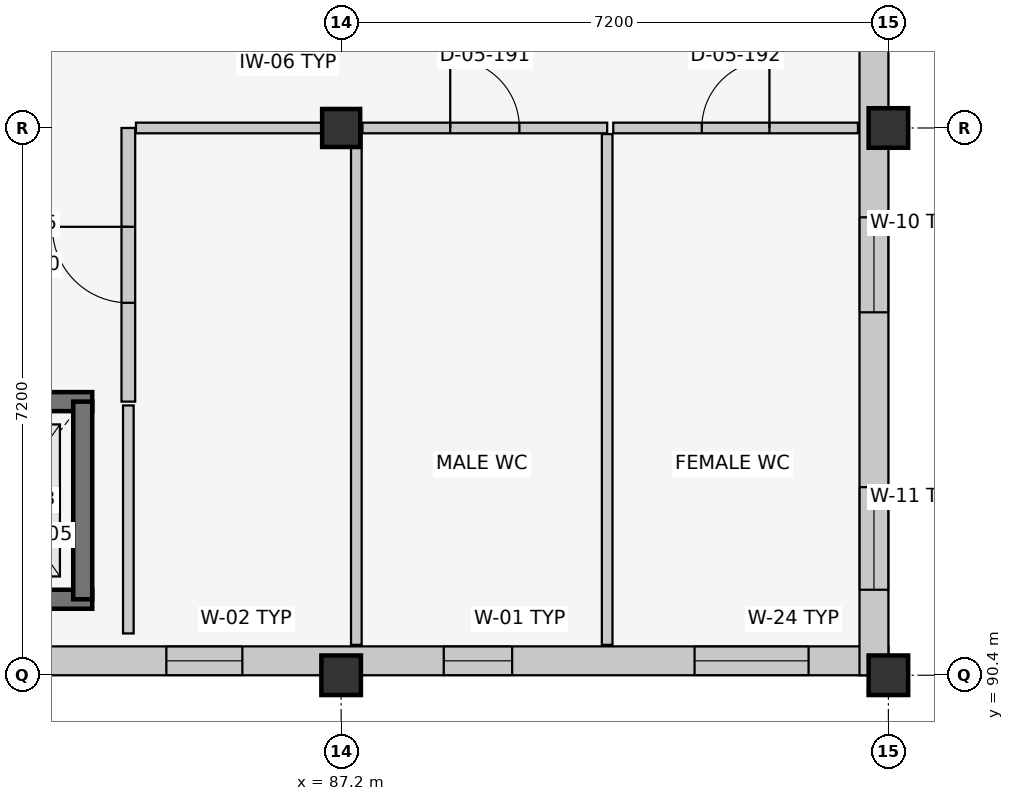
"""IFC4 building model, lengths in metres.
Left out: names, types, materials, properties, quantities, classifications, styles, units other than length and angle.
Written with IfcOpenShell. Run it as: python <this file> out.ifc"""

import sys

from ifc_helpers import new_model, si_unit, direction, frame, frame_2d, origin, origin_2d, place, context, subcontext, project, spatial, rectangle, extrude, element, fill, save


model = new_model("IFC4")
c1 = context("Model", 3, precision=1e-05, world=origin(), true_north=direction((0.0, 1.0)))
c2 = subcontext(c1, "Body", "Model", "MODEL_VIEW")
j1 = project(units=[si_unit("LENGTHUNIT", "METRE"), si_unit("PLANEANGLEUNIT", "RADIAN")], contexts=[c1])
p1 = place(None, origin())
s1 = spatial("IfcSite", under=j1, at=p1, CompositionType="ELEMENT")
p2 = place(p1, origin())
s2 = spatial("IfcBuilding", under=s1, at=p2, CompositionType="ELEMENT")
p3 = place(p2, frame((0.0, 0.0, 21.9)))
s3 = spatial("IfcBuildingStorey", under=s2, at=p3, CompositionType="ELEMENT", Elevation=21.9)
p4 = place(p3, frame((87.2, 90.4, 0.0), z_axis=(0.0, 0.0, 1.0), x_axis=(1.0, 0.0, 0.0)))
e1 = element("IfcColumn", 1, at=p4, inside=s3, PredefinedType="COLUMN", context=c2, shape_type="SweptSolid", body=[
    extrude(rectangle(XDim=0.52, YDim=0.52, at=origin_2d()), origin(), (0.0, 0.0, 1.0), 3.9),
])
p5 = place(p3, frame((87.2, 97.6, 0.0), z_axis=(0.0, 0.0, 1.0), x_axis=(1.0, 0.0, 0.0)))
e2 = element("IfcColumn", 2, at=p5, inside=s3, PredefinedType="COLUMN", context=c2, shape_type="SweptSolid", body=[
    extrude(rectangle(XDim=0.5, YDim=0.5, at=origin_2d()), origin(), (0.0, 0.0, 1.0), 3.9),
])
for number, where, z_axis, x_axis in (
    (3, (94.4, 90.4, 0.0), (0.0, 0.0, 1.0), (1.0, 0.0, 0.0)),
    (4, (94.4, 97.6, 0.0), (0.0, 0.0, 1.0), (1.0, 0.0, 0.0)),
):
    element("IfcColumn", number, at=place(p3, frame(where, z_axis=z_axis, x_axis=x_axis)), inside=s3, PredefinedType="COLUMN", context=c2, shape_type="SweptSolid", body=[
        extrude(rectangle(XDim=0.52, YDim=0.52, at=origin_2d()), origin(), (0.0, 0.0, 1.0), 3.9),
    ])
p6 = place(p3, frame((94.4, 90.59, 0.0), z_axis=(0.0, 0.0, 1.0), x_axis=(-1.0, 0.0, 0.0)))
e5 = element("IfcWall", 5, at=p6, inside=s3, PredefinedType="SOLIDWALL", context=c2, shape_type="SweptSolid", body=[
    extrude(rectangle(XDim=28.8, YDim=0.38, at=frame_2d((14.4, 0.0))), origin(), (0.0, 0.0, 1.0), 2.955),
])
p7 = place(p6, frame((1.05, 0.0, 0.9)))
e6 = element("IfcOpeningElement", 6, at=p7, cuts=e5, PredefinedType="OPENING", context=c2, shape_type="SweptSolid", body=[
    extrude(rectangle(XDim=1.5, YDim=1.75, at=frame_2d((0.75, 0.875))), frame((0.0, 0.202, 0.0), z_axis=(0.0, -1.0, 0.0), x_axis=(1.0, 0.0, 0.0)), (0.0, 0.0, 1.0), 0.404),
])
p8 = place(p6, frame((4.95, 0.0, 0.9)))
e7 = element("IfcOpeningElement", 7, at=p8, cuts=e5, PredefinedType="OPENING", context=c2, shape_type="SweptSolid", body=[
    extrude(rectangle(XDim=0.9, YDim=1.35, at=frame_2d((0.45, 0.675))), frame((0.0, 0.202, 0.0), z_axis=(0.0, -1.0, 0.0), x_axis=(1.0, 0.0, 0.0)), (0.0, 0.0, 1.0), 0.404),
])
p9 = place(p6, frame((8.5, 0.0, 0.9)))
e8 = element("IfcOpeningElement", 8, at=p9, cuts=e5, PredefinedType="OPENING", context=c2, shape_type="SweptSolid", body=[
    extrude(rectangle(XDim=1.0, YDim=1.35, at=frame_2d((0.5, 0.675))), frame((0.0, 0.202, 0.0), z_axis=(0.0, -1.0, 0.0), x_axis=(1.0, 0.0, 0.0)), (0.0, 0.0, 1.0), 0.404),
])
p10 = place(p6, frame((12.05, 0.0, 0.9)))
e9 = element("IfcOpeningElement", 9, at=p10, cuts=e5, PredefinedType="OPENING", context=c2, shape_type="SweptSolid", body=[
    extrude(rectangle(XDim=1.1, YDim=1.35, at=frame_2d((0.55, 0.675))), frame((0.0, 0.202, 0.0), z_axis=(0.0, -1.0, 0.0), x_axis=(1.0, 0.0, 0.0)), (0.0, 0.0, 1.0), 0.404),
])
p11 = place(p6, frame((15.6, 0.0, 0.9)))
e10 = element("IfcOpeningElement", 10, at=p11, cuts=e5, PredefinedType="OPENING", context=c2, shape_type="SweptSolid", body=[
    extrude(rectangle(XDim=1.2, YDim=1.35, at=frame_2d((0.6, 0.675))), frame((0.0, 0.202, 0.0), z_axis=(0.0, -1.0, 0.0), x_axis=(1.0, 0.0, 0.0)), (0.0, 0.0, 1.0), 0.404),
])
p12 = place(p6, frame((19.15, 0.0, 0.9)))
e11 = element("IfcOpeningElement", 11, at=p12, cuts=e5, PredefinedType="OPENING", context=c2, shape_type="SweptSolid", body=[
    extrude(rectangle(XDim=1.3, YDim=1.35, at=frame_2d((0.65, 0.675))), frame((0.0, 0.202, 0.0), z_axis=(0.0, -1.0, 0.0), x_axis=(1.0, 0.0, 0.0)), (0.0, 0.0, 1.0), 0.404),
])
p13 = place(p6, frame((26.525, 0.0, 0.9)))
e12 = element("IfcOpeningElement", 12, at=p13, cuts=e5, PredefinedType="OPENING", context=c2, shape_type="SweptSolid", body=[
    extrude(rectangle(XDim=0.95, YDim=1.45, at=frame_2d((0.475, 0.725))), frame((0.0, 0.202, 0.0), z_axis=(0.0, -1.0, 0.0), x_axis=(1.0, 0.0, 0.0)), (0.0, 0.0, 1.0), 0.404),
])
p14 = place(p3, frame((94.21, 104.8, 0.0), z_axis=(0.0, 0.0, 1.0), x_axis=(0.0, -1.0, 0.0)))
e13 = element("IfcWall", 13, at=p14, inside=s3, PredefinedType="SOLIDWALL", context=c2, shape_type="SweptSolid", body=[
    extrude(rectangle(XDim=14.4, YDim=0.38, at=frame_2d((7.2, 0.0))), origin(), (0.0, 0.0, 1.0), 2.915),
])
p15 = place(p14, frame((1.275, 0.0, 0.9)))
e14 = element("IfcOpeningElement", 14, at=p15, cuts=e13, PredefinedType="OPENING", context=c2, shape_type="SweptSolid", body=[
    extrude(rectangle(XDim=1.05, YDim=1.45, at=frame_2d((0.525, 0.725))), frame((0.0, 0.202, 0.0), z_axis=(0.0, -1.0, 0.0), x_axis=(1.0, 0.0, 0.0)), (0.0, 0.0, 1.0), 0.404),
])
p16 = place(p14, frame((8.375, 0.0, 0.9)))
e15 = element("IfcOpeningElement", 15, at=p16, cuts=e13, PredefinedType="OPENING", context=c2, shape_type="SweptSolid", body=[
    extrude(rectangle(XDim=1.25, YDim=1.45, at=frame_2d((0.625, 0.725))), frame((0.0, 0.202, 0.0), z_axis=(0.0, -1.0, 0.0), x_axis=(1.0, 0.0, 0.0)), (0.0, 0.0, 1.0), 0.404),
])
p17 = place(p14, frame((11.925, 0.0, 0.9)))
e16 = element("IfcOpeningElement", 16, at=p17, cuts=e13, PredefinedType="OPENING", context=c2, shape_type="SweptSolid", body=[
    extrude(rectangle(XDim=1.35, YDim=1.45, at=frame_2d((0.675, 0.725))), frame((0.0, 0.202, 0.0), z_axis=(0.0, -1.0, 0.0), x_axis=(1.0, 0.0, 0.0)), (0.0, 0.0, 1.0), 0.404),
])
p18 = place(p3, frame((81.675, 91.4, 0.0), z_axis=(0.0, 0.0, 1.0), x_axis=(1.0, 0.0, 0.0)))
e17 = element("IfcWall", 17, at=p18, inside=s3, PredefinedType="SHEAR", context=c2, shape_type="SweptSolid", body=[
    extrude(rectangle(XDim=2.25, YDim=0.25, at=frame_2d((1.125, 0.0))), origin(), (0.0, 0.0, 1.0), 3.66),
])
p19 = place(p3, frame((83.925, 94.0, 0.0), z_axis=(0.0, 0.0, 1.0), x_axis=(-1.0, 0.0, 0.0)))
e18 = element("IfcWall", 18, at=p19, inside=s3, PredefinedType="SHEAR", context=c2, shape_type="SweptSolid", body=[
    extrude(rectangle(XDim=2.25, YDim=0.25, at=frame_2d((1.125, 0.0))), origin(), (0.0, 0.0, 1.0), 3.66),
])
p20 = place(p19, frame((0.625, 0.0, 0.0)))
e19 = element("IfcOpeningElement", 19, at=p20, cuts=e18, PredefinedType="OPENING", context=c2, shape_type="SweptSolid", body=[
    extrude(rectangle(XDim=1.0, YDim=2.15, at=frame_2d((0.5, 1.075))), frame((0.0, 0.137, 0.0), z_axis=(0.0, -1.0, 0.0), x_axis=(1.0, 0.0, 0.0)), (0.0, 0.0, 1.0), 0.274),
])
p21 = place(p3, frame((83.8, 91.4, 0.0), z_axis=(0.0, 0.0, 1.0), x_axis=(0.0, 1.0, 0.0)))
e20 = element("IfcWall", 20, at=p21, inside=s3, PredefinedType="SHEAR", context=c2, shape_type="SweptSolid", body=[
    extrude(rectangle(XDim=2.6, YDim=0.25, at=frame_2d((1.3, 0.0))), origin(), (0.0, 0.0, 1.0), 3.66),
])
p22 = place(p3, frame((84.4, 94.0, 0.0), z_axis=(0.0, 0.0, 1.0), x_axis=(0.0, 1.0, 0.0)))
e21 = element("IfcWall", 21, at=p22, inside=s3, PredefinedType="PARTITIONING", context=c2, shape_type="SweptSolid", body=[
    extrude(rectangle(XDim=3.6, YDim=0.18, at=frame_2d((1.8, 0.0))), origin(), (0.0, 0.0, 1.0), 3.66),
])
p23 = place(p22, frame((1.3, 0.0, 0.0)))
e22 = element("IfcOpeningElement", 22, at=p23, cuts=e21, PredefinedType="OPENING", context=c2, shape_type="SweptSolid", body=[
    extrude(rectangle(XDim=1.0, YDim=2.1, at=frame_2d((0.5, 1.05))), frame((0.0, 0.102, 0.0), z_axis=(0.0, -1.0, 0.0), x_axis=(1.0, 0.0, 0.0)), (0.0, 0.0, 1.0), 0.204),
])
p24 = place(p3, frame((84.5, 97.6, 0.0), z_axis=(0.0, 0.0, 1.0), x_axis=(1.0, 0.0, 0.0)))
e23 = element("IfcWall", 23, at=p24, inside=s3, PredefinedType="PARTITIONING", context=c2, shape_type="SweptSolid", body=[
    extrude(rectangle(XDim=2.9, YDim=0.14, at=frame_2d((1.45, 0.0))), origin(), (0.0, 0.0, 1.0), 2.985),
])
p25 = place(p3, frame((87.4, 90.8, 0.0), z_axis=(0.0, 0.0, 1.0), x_axis=(0.0, 1.0, 0.0)))
e24 = element("IfcWall", 24, at=p25, inside=s3, PredefinedType="PARTITIONING", context=c2, shape_type="SweptSolid", body=[
    extrude(rectangle(XDim=6.72, YDim=0.14, at=frame_2d((3.36, 0.0))), origin(), (0.0, 0.0, 1.0), 3.035),
])
p26 = place(p3, frame((87.48, 97.6, 0.0), z_axis=(0.0, 0.0, 1.0), x_axis=(1.0, 0.0, 0.0)))
e25 = element("IfcWall", 25, at=p26, inside=s3, PredefinedType="PARTITIONING", context=c2, shape_type="SweptSolid", body=[
    extrude(rectangle(XDim=3.22, YDim=0.14, at=frame_2d((1.61, 0.0))), origin(), (0.0, 0.0, 1.0), 2.935),
])
p27 = place(p26, frame((1.155, 0.0, 0.0)))
e26 = element("IfcOpeningElement", 26, at=p27, cuts=e25, PredefinedType="OPENING", context=c2, shape_type="SweptSolid", body=[
    extrude(rectangle(XDim=0.91, YDim=2.06, at=frame_2d((0.455, 1.03))), frame((0.0, 0.082, 0.0), z_axis=(0.0, -1.0, 0.0), x_axis=(1.0, 0.0, 0.0)), (0.0, 0.0, 1.0), 0.164),
])
p28 = place(p3, frame((90.7, 90.8, 0.0), z_axis=(0.0, 0.0, 1.0), x_axis=(0.0, 1.0, 0.0)))
e27 = element("IfcWall", 27, at=p28, inside=s3, PredefinedType="PARTITIONING", context=c2, shape_type="SweptSolid", body=[
    extrude(rectangle(XDim=6.72, YDim=0.14, at=frame_2d((3.36, 0.0))), origin(), (0.0, 0.0, 1.0), 3.405),
])
p29 = place(p3, frame((90.78, 97.6, 0.0), z_axis=(0.0, 0.0, 1.0), x_axis=(1.0, 0.0, 0.0)))
e28 = element("IfcWall", 28, at=p29, inside=s3, PredefinedType="PARTITIONING", context=c2, shape_type="SweptSolid", body=[
    extrude(rectangle(XDim=3.22, YDim=0.14, at=frame_2d((1.61, 0.0))), origin(), (0.0, 0.0, 1.0), 2.935),
])
p30 = place(p29, frame((1.165, 0.0, 0.0)))
e29 = element("IfcOpeningElement", 29, at=p30, cuts=e28, PredefinedType="OPENING", context=c2, shape_type="SweptSolid", body=[
    extrude(rectangle(XDim=0.89, YDim=2.05, at=frame_2d((0.445, 1.025))), frame((0.0, 0.082, 0.0), z_axis=(0.0, -1.0, 0.0), x_axis=(1.0, 0.0, 0.0)), (0.0, 0.0, 1.0), 0.164),
])
p31 = place(p3, frame((84.4, 90.95, 0.0), z_axis=(0.0, 0.0, 1.0), x_axis=(0.0, 1.0, 0.0)))
e30 = element("IfcWall", 30, at=p31, inside=s3, PredefinedType="PARTITIONING", context=c2, shape_type="SweptSolid", body=[
    extrude(rectangle(XDim=3.0, YDim=0.14, at=frame_2d((1.5, 0.0))), origin(), (0.0, 0.0, 1.0), 3.66),
])
p32 = place(p7, origin())
e31 = element("IfcWindow", 31, at=p32, inside=s3, PartitioningType="SINGLE_PANEL", PredefinedType="WINDOW", context=c2, shape_type="SweptSolid", body=[
    extrude(rectangle(XDim=1.5, YDim=1.75, at=frame_2d((0.75, 0.875))), frame((0.0, 0.03, 0.0), z_axis=(0.0, -1.0, 0.0), x_axis=(1.0, 0.0, 0.0)), (0.0, 0.0, 1.0), 0.06),
])
fill(e6, e31)
p33 = place(p8, origin())
e32 = element("IfcWindow", 32, at=p33, inside=s3, PartitioningType="SINGLE_PANEL", PredefinedType="WINDOW", context=c2, shape_type="SweptSolid", body=[
    extrude(rectangle(XDim=0.9, YDim=1.35, at=frame_2d((0.45, 0.675))), frame((0.0, 0.03, 0.0), z_axis=(0.0, -1.0, 0.0), x_axis=(1.0, 0.0, 0.0)), (0.0, 0.0, 1.0), 0.06),
])
fill(e7, e32)
p34 = place(p9, origin())
e33 = element("IfcWindow", 33, at=p34, inside=s3, PartitioningType="SINGLE_PANEL", PredefinedType="WINDOW", context=c2, shape_type="SweptSolid", body=[
    extrude(rectangle(XDim=1.0, YDim=1.35, at=frame_2d((0.5, 0.675))), frame((0.0, 0.03, 0.0), z_axis=(0.0, -1.0, 0.0), x_axis=(1.0, 0.0, 0.0)), (0.0, 0.0, 1.0), 0.06),
])
fill(e8, e33)
p35 = place(p16, origin())
e34 = element("IfcWindow", 34, at=p35, inside=s3, PartitioningType="SINGLE_PANEL", PredefinedType="WINDOW", context=c2, shape_type="SweptSolid", body=[
    extrude(rectangle(XDim=1.25, YDim=1.45, at=frame_2d((0.625, 0.725))), frame((0.0, 0.03, 0.0), z_axis=(0.0, -1.0, 0.0), x_axis=(1.0, 0.0, 0.0)), (0.0, 0.0, 1.0), 0.06),
])
fill(e15, e34)
p36 = place(p17, origin())
e35 = element("IfcWindow", 35, at=p36, inside=s3, PartitioningType="SINGLE_PANEL", PredefinedType="WINDOW", context=c2, shape_type="SweptSolid", body=[
    extrude(rectangle(XDim=1.35, YDim=1.45, at=frame_2d((0.675, 0.725))), frame((0.0, 0.03, 0.0), z_axis=(0.0, -1.0, 0.0), x_axis=(1.0, 0.0, 0.0)), (0.0, 0.0, 1.0), 0.06),
])
fill(e16, e35)
p37 = place(p23, origin())
e36 = element("IfcDoor", 36, at=p37, inside=s3, OperationType="SINGLE_SWING_RIGHT", PredefinedType="DOOR", context=c2, shape_type="SweptSolid", body=[
    extrude(rectangle(XDim=1.0, YDim=2.1, at=frame_2d((0.5, 1.05))), frame((0.0, 0.025, 0.0), z_axis=(0.0, -1.0, 0.0), x_axis=(1.0, 0.0, 0.0)), (0.0, 0.0, 1.0), 0.05),
])
fill(e22, e36)
p38 = place(p27, origin())
e37 = element("IfcDoor", 37, at=p38, inside=s3, OperationType="SINGLE_SWING_LEFT", PredefinedType="DOOR", context=c2, shape_type="SweptSolid", body=[
    extrude(rectangle(XDim=0.91, YDim=2.06, at=frame_2d((0.455, 1.03))), frame((0.0, 0.025, 0.0), z_axis=(0.0, -1.0, 0.0), x_axis=(1.0, 0.0, 0.0)), (0.0, 0.0, 1.0), 0.05),
])
fill(e26, e37)
p39 = place(p30, origin())
e38 = element("IfcDoor", 38, at=p39, inside=s3, OperationType="SINGLE_SWING_RIGHT", PredefinedType="DOOR", context=c2, shape_type="SweptSolid", body=[
    extrude(rectangle(XDim=0.89, YDim=2.05, at=frame_2d((0.445, 1.025))), frame((0.0, 0.025, 0.0), z_axis=(0.0, -1.0, 0.0), x_axis=(1.0, 0.0, 0.0)), (0.0, 0.0, 1.0), 0.05),
])
fill(e29, e38)
save(model, sys.argv[1])
